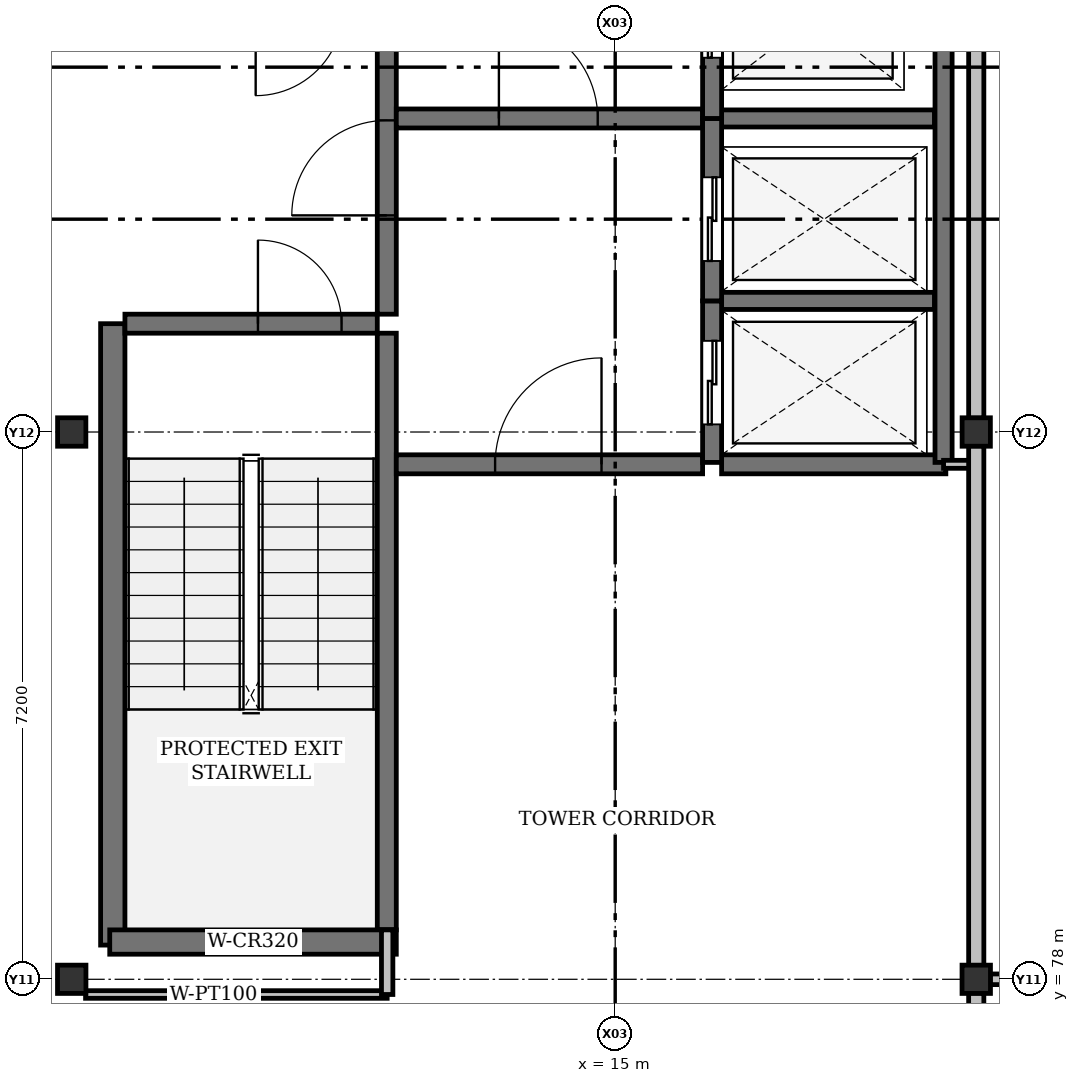
"""IFC4 building model, lengths in metres.
Left out: names, types, materials, properties, quantities, classifications, styles, units other than length and angle.
Written with IfcOpenShell. Run it as: python <this file> out.ifc"""

import sys

from ifc_helpers import new_model, si_unit, direction, frame, frame_2d, origin, origin_2d, place, context, subcontext, project, spatial, rectangle, i_section, extrude, element, fill, save


model = new_model("IFC4")
c1 = context("Model", 3, precision=1e-05, world=origin(), true_north=direction((0.0, 1.0)))
c2 = subcontext(c1, "Body", "Model", "MODEL_VIEW")
j1 = project(units=[si_unit("LENGTHUNIT", "METRE"), si_unit("PLANEANGLEUNIT", "RADIAN")], contexts=[c1])
p1 = place(None, origin())
s1 = spatial("IfcSite", under=j1, at=p1, CompositionType="ELEMENT")
p2 = place(p1, origin())
s2 = spatial("IfcBuilding", under=s1, at=p2, CompositionType="ELEMENT")
p3 = place(p2, frame((0.0, 0.0, 30.9)))
s3 = spatial("IfcBuildingStorey", under=s2, at=p3, CompositionType="ELEMENT", Elevation=30.9)
for number, where, z_axis, x_axis in (
    (1, (7.85, 78.0, 0.0), (0.0, 0.0, 1.0), (1.0, 0.0, 0.0)),
    (2, (19.75, 78.0, 0.0), (0.0, 0.0, 1.0), (1.0, 0.0, 0.0)),
    (3, (7.85, 85.2, 0.0), (0.0, 0.0, 1.0), (0.0, 1.0, 0.0)),
    (4, (19.75, 85.2, 0.0), (0.0, 0.0, 1.0), (0.0, 1.0, 0.0)),
):
    element("IfcColumn", number, at=place(p3, frame(where, z_axis=z_axis, x_axis=x_axis)), inside=s3, PredefinedType="COLUMN", context=c2, shape_type="SweptSolid", body=[
        extrude(i_section(OverallWidth=0.374, OverallDepth=0.372, WebThickness=0.016, FlangeThickness=0.026, FilletRadius=0.015, at=origin_2d()), origin(), (0.0, 0.0, 1.0), 4.2),
    ])
p4 = place(p3, frame((8.39, 78.45, 0.0), z_axis=(0.0, 0.0, 1.0), x_axis=(0.0, 1.0, 0.0)))
e5 = element("IfcWall", 5, at=p4, inside=s3, PredefinedType="SHEAR", context=c2, shape_type="SweptSolid", body=[
    extrude(rectangle(XDim=8.175, YDim=0.32, at=frame_2d((4.087, 0.0))), origin(), (0.0, 0.0, 1.0), 4.2),
])
p5 = place(p3, frame((11.995, 78.65, 0.0), z_axis=(0.0, 0.0, 1.0), x_axis=(0.0, 1.0, 0.0)))
e6 = element("IfcWall", 6, at=p5, inside=s3, PredefinedType="SHEAR", context=c2, shape_type="SweptSolid", body=[
    extrude(rectangle(XDim=7.85, YDim=0.25, at=frame_2d((3.925, 0.0))), origin(), (0.0, 0.0, 1.0), 4.2),
])
p6 = place(p3, frame((11.995, 86.75, 0.0), z_axis=(0.0, 0.0, 1.0), x_axis=(0.0, 1.0, 0.0)))
e7 = element("IfcWall", 7, at=p6, inside=s3, PredefinedType="SHEAR", context=c2, shape_type="SweptSolid", body=[
    extrude(rectangle(XDim=3.9, YDim=0.25, at=frame_2d((1.95, 0.0))), origin(), (0.0, 0.0, 1.0), 4.2),
])
p7 = place(p6, frame((1.3, 0.0, 0.0)))
e8 = element("IfcOpeningElement", 8, at=p7, cuts=e7, PredefinedType="OPENING", context=c2, shape_type="SweptSolid", body=[
    extrude(rectangle(XDim=1.25, YDim=2.2, at=frame_2d((0.625, 1.1))), frame((0.0, 0.125, 0.0), z_axis=(0.0, -1.0, 0.0), x_axis=(1.0, 0.0, 0.0)), (0.0, 0.0, 1.0), 0.25),
])
p8 = place(p3, frame((8.35, 78.49, 0.0), z_axis=(0.0, 0.0, 1.0), x_axis=(1.0, 0.0, 0.0)))
e9 = element("IfcWall", 9, at=p8, inside=s3, PredefinedType="SHEAR", context=c2, shape_type="SweptSolid", body=[
    extrude(rectangle(XDim=3.77, YDim=0.32, at=frame_2d((1.885, 0.0))), origin(), (0.0, 0.0, 1.0), 4.2),
])
p9 = place(p3, frame((8.55, 86.625, 0.0), z_axis=(0.0, 0.0, 1.0), x_axis=(1.0, 0.0, 0.0)))
e10 = element("IfcWall", 10, at=p9, inside=s3, PredefinedType="SHEAR", context=c2, shape_type="SweptSolid", body=[
    extrude(rectangle(XDim=3.32, YDim=0.25, at=frame_2d((1.66, 0.0))), origin(), (0.0, 0.0, 1.0), 4.2),
])
p10 = place(p9, frame((1.75, 0.0, 0.0)))
e11 = element("IfcOpeningElement", 11, at=p10, cuts=e10, PredefinedType="OPENING", context=c2, shape_type="SweptSolid", body=[
    extrude(rectangle(XDim=1.1, YDim=2.15, at=frame_2d((0.55, 1.075))), frame((0.0, 0.125, 0.0), z_axis=(0.0, -1.0, 0.0), x_axis=(1.0, 0.0, 0.0)), (0.0, 0.0, 1.0), 0.25),
])
p11 = place(p3, frame((12.12, 89.325, 0.0), z_axis=(0.0, 0.0, 1.0), x_axis=(1.0, 0.0, 0.0)))
e12 = element("IfcWall", 12, at=p11, inside=s3, PredefinedType="SHEAR", context=c2, shape_type="SweptSolid", body=[
    extrude(rectangle(XDim=4.03, YDim=0.25, at=frame_2d((2.015, 0.0))), origin(), (0.0, 0.0, 1.0), 4.2),
])
p12 = place(p11, frame((1.35, 0.0, 0.0)))
e13 = element("IfcOpeningElement", 13, at=p12, cuts=e12, PredefinedType="OPENING", context=c2, shape_type="SweptSolid", body=[
    extrude(rectangle(XDim=1.3, YDim=2.2, at=frame_2d((0.65, 1.1))), frame((0.0, 0.125, 0.0), z_axis=(0.0, -1.0, 0.0), x_axis=(1.0, 0.0, 0.0)), (0.0, 0.0, 1.0), 0.25),
])
p13 = place(p3, frame((12.12, 84.775, 0.0), z_axis=(0.0, 0.0, 1.0), x_axis=(1.0, 0.0, 0.0)))
e14 = element("IfcWall", 14, at=p13, inside=s3, PredefinedType="SHEAR", context=c2, shape_type="SweptSolid", body=[
    extrude(rectangle(XDim=4.03, YDim=0.25, at=frame_2d((2.015, 0.0))), origin(), (0.0, 0.0, 1.0), 4.2),
])
p14 = place(p13, frame((1.3, 0.0, 0.0)))
e15 = element("IfcOpeningElement", 15, at=p14, cuts=e14, PredefinedType="OPENING", context=c2, shape_type="SweptSolid", body=[
    extrude(rectangle(XDim=1.4, YDim=2.25, at=frame_2d((0.7, 1.125))), frame((0.0, 0.125, 0.0), z_axis=(0.0, -1.0, 0.0), x_axis=(1.0, 0.0, 0.0)), (0.0, 0.0, 1.0), 0.25),
])
p15 = place(p3, frame((16.4, 84.775, 0.0), z_axis=(0.0, 0.0, 1.0), x_axis=(1.0, 0.0, 0.0)))
e16 = element("IfcWall", 16, at=p15, inside=s3, PredefinedType="SHEAR", context=c2, shape_type="SweptSolid", body=[
    extrude(rectangle(XDim=2.95, YDim=0.25, at=frame_2d((1.475, 0.0))), origin(), (0.0, 0.0, 1.0), 4.2),
])
p16 = place(p3, frame((19.32, 84.8, 0.0), z_axis=(0.0, 0.0, 1.0), x_axis=(0.0, 1.0, 0.0)))
e17 = element("IfcWall", 17, at=p16, inside=s3, PredefinedType="SHEAR", context=c2, shape_type="SweptSolid", body=[
    extrude(rectangle(XDim=13.95, YDim=0.225, at=frame_2d((6.975, 0.0))), origin(), (0.0, 0.0, 1.0), 4.2),
])
for number, where, z_axis, x_axis in (
    (18, (16.4, 86.925, 0.0), (0.0, 0.0, 1.0), (1.0, 0.0, 0.0)),
    (19, (16.4, 89.325, 0.0), (0.0, 0.0, 1.0), (1.0, 0.0, 0.0)),
):
    element("IfcWall", number, at=place(p3, frame(where, z_axis=z_axis, x_axis=x_axis)), inside=s3, PredefinedType="SHEAR", context=c2, shape_type="SweptSolid", body=[
        extrude(rectangle(XDim=2.8, YDim=0.225, at=frame_2d((1.4, 0.0))), origin(), (0.0, 0.0, 1.0), 4.2),
    ])
p17 = place(p3, frame((16.275, 84.8, 0.0), z_axis=(0.0, 0.0, 1.0), x_axis=(0.0, 1.0, 0.0)))
e20 = element("IfcWall", 20, at=p17, inside=s3, PredefinedType="SHEAR", context=c2, shape_type="SweptSolid", body=[
    extrude(rectangle(XDim=2.125, YDim=0.25, at=frame_2d((1.062, 0.0))), origin(), (0.0, 0.0, 1.0), 4.2),
])
p18 = place(p17, frame((0.5, 0.0, 0.0)))
e21 = element("IfcOpeningElement", 21, at=p18, cuts=e20, PredefinedType="OPENING", context=c2, shape_type="SweptSolid", body=[
    extrude(rectangle(XDim=1.1, YDim=2.15, at=frame_2d((0.55, 1.075))), frame((0.0, 0.125, 0.0), z_axis=(0.0, -1.0, 0.0), x_axis=(1.0, 0.0, 0.0)), (0.0, 0.0, 1.0), 0.25),
])
p19 = place(p3, frame((16.275, 86.925, 0.0), z_axis=(0.0, 0.0, 1.0), x_axis=(0.0, 1.0, 0.0)))
e22 = element("IfcWall", 22, at=p19, inside=s3, PredefinedType="SHEAR", context=c2, shape_type="SweptSolid", body=[
    extrude(rectangle(XDim=2.4, YDim=0.25, at=frame_2d((1.2, 0.0))), origin(), (0.0, 0.0, 1.0), 4.2),
])
p20 = place(p19, frame((0.525, 0.0, 0.0)))
e23 = element("IfcOpeningElement", 23, at=p20, cuts=e22, PredefinedType="OPENING", context=c2, shape_type="SweptSolid", body=[
    extrude(rectangle(XDim=1.1, YDim=2.15, at=frame_2d((0.55, 1.075))), frame((0.0, 0.125, 0.0), z_axis=(0.0, -1.0, 0.0), x_axis=(1.0, 0.0, 0.0)), (0.0, 0.0, 1.0), 0.25),
])
p21 = place(p3, frame((16.275, 89.325, 0.0), z_axis=(0.0, 0.0, 1.0), x_axis=(0.0, 1.0, 0.0)))
e24 = element("IfcWall", 24, at=p21, inside=s3, PredefinedType="SHEAR", context=c2, shape_type="SweptSolid", body=[
    extrude(rectangle(XDim=2.4, YDim=0.25, at=frame_2d((1.2, 0.0))), origin(), (0.0, 0.0, 1.0), 4.2),
])
p22 = place(p21, frame((0.8, 0.0, 0.0)))
e25 = element("IfcOpeningElement", 25, at=p22, cuts=e24, PredefinedType="OPENING", context=c2, shape_type="SweptSolid", body=[
    extrude(rectangle(XDim=1.05, YDim=2.15, at=frame_2d((0.525, 1.075))), frame((0.0, 0.125, 0.0), z_axis=(0.0, -1.0, 0.0), x_axis=(1.0, 0.0, 0.0)), (0.0, 0.0, 1.0), 0.25),
])
p23 = place(p3, frame((19.32, 84.775, 0.0), z_axis=(0.0, 0.0, 1.0), x_axis=(1.0, 0.0, 0.0)))
e26 = element("IfcWall", 26, at=p23, inside=s3, PredefinedType="PARTITIONING", context=c2, shape_type="SweptSolid", body=[
    extrude(rectangle(XDim=0.43, YDim=0.105, at=frame_2d((0.215, 0.0))), origin(), (0.0, 0.0, 1.0), 3.512),
])
p24 = place(p3, frame((8.032, 77.8, 0.0), z_axis=(0.0, 0.0, 1.0), x_axis=(1.0, 0.0, 0.0)))
e27 = element("IfcWall", 27, at=p24, inside=s3, PredefinedType="PARTITIONING", context=c2, shape_type="SweptSolid", body=[
    extrude(rectangle(XDim=3.968, YDim=0.1, at=frame_2d((1.984, 0.0))), origin(), (0.0, 0.0, 1.0), 3.436),
])
p25 = place(p3, frame((12.0, 77.8, 0.0), z_axis=(0.0, 0.0, 1.0), x_axis=(0.0, 1.0, 0.0)))
e28 = element("IfcWall", 28, at=p25, inside=s3, PredefinedType="PARTITIONING", context=c2, shape_type="SweptSolid", body=[
    extrude(rectangle(XDim=0.85, YDim=0.15, at=frame_2d((0.425, 0.0))), origin(), (0.0, 0.0, 1.0), 3.436),
])
p26 = place(p3, frame((19.75, 78.181, 0.0), z_axis=(0.0, 0.0, 1.0), x_axis=(0.0, 1.0, 0.0)))
e29 = element("IfcWall", 29, at=p26, inside=s3, PredefinedType="SOLIDWALL", context=c2, shape_type="SweptSolid", body=[
    extrude(rectangle(XDim=6.837, YDim=0.2, at=frame_2d((3.418, 0.0))), origin(), (0.0, 0.0, 1.0), 3.512),
])
p27 = place(p3, frame((19.75, 85.382, 0.0), z_axis=(0.0, 0.0, 1.0), x_axis=(0.0, 1.0, 0.0)))
e30 = element("IfcWall", 30, at=p27, inside=s3, PredefinedType="SOLIDWALL", context=c2, shape_type="SweptSolid", body=[
    extrude(rectangle(XDim=6.837, YDim=0.2, at=frame_2d((3.418, 0.0))), origin(), (0.0, 0.0, 1.0), 3.512),
])
p28 = place(p3, frame((27.743, 78.0, 0.0), z_axis=(0.0, 0.0, 1.0), x_axis=(-1.0, 0.0, 0.0)))
e31 = element("IfcWall", 31, at=p28, inside=s3, PredefinedType="PARTITIONING", context=c2, shape_type="SweptSolid", body=[
    extrude(rectangle(XDim=7.811, YDim=0.14, at=frame_2d((3.906, 0.0))), origin(), (0.0, 0.0, 1.0), 2.775),
])
p29 = place(p3, frame((19.75, 70.682, 0.0), z_axis=(0.0, 0.0, 1.0), x_axis=(0.0, 1.0, 0.0)))
e32 = element("IfcWall", 32, at=p29, inside=s3, PredefinedType="SOLIDWALL", context=c2, shape_type="SweptSolid", body=[
    extrude(rectangle(XDim=7.137, YDim=0.2, at=frame_2d((3.569, 0.0))), origin(), (0.0, 0.0, 1.0), 3.512),
])
p30 = place(p29, frame((5.318, 0.0, 0.0)))
e33 = element("IfcOpeningElement", 33, at=p30, cuts=e32, PredefinedType="OPENING", context=c2, shape_type="SweptSolid", body=[
    extrude(rectangle(XDim=1.5, YDim=2.3, at=frame_2d((0.75, 1.15))), frame((0.0, 0.1, 0.0), z_axis=(0.0, -1.0, 0.0), x_axis=(1.0, 0.0, 0.0)), (0.0, 0.0, 1.0), 0.2),
])
p31 = place(p7, origin())
e34 = element("IfcDoor", 34, at=p31, inside=s3, OperationType="SINGLE_SWING_LEFT", PredefinedType="DOOR", context=c2, shape_type="SweptSolid", body=[
    extrude(rectangle(XDim=1.25, YDim=2.2, at=frame_2d((0.625, 1.1))), frame((0.0, 0.025, 0.0), z_axis=(0.0, -1.0, 0.0), x_axis=(1.0, 0.0, 0.0)), (0.0, 0.0, 1.0), 0.05),
])
fill(e8, e34)
p32 = place(p10, origin())
e35 = element("IfcDoor", 35, at=p32, inside=s3, OperationType="SINGLE_SWING_LEFT", PredefinedType="DOOR", context=c2, shape_type="SweptSolid", body=[
    extrude(rectangle(XDim=1.1, YDim=2.15, at=frame_2d((0.55, 1.075))), frame((0.0, 0.025, 0.0), z_axis=(0.0, -1.0, 0.0), x_axis=(1.0, 0.0, 0.0)), (0.0, 0.0, 1.0), 0.05),
])
fill(e11, e35)
p33 = place(p12, origin())
e36 = element("IfcDoor", 36, at=p33, inside=s3, OperationType="SINGLE_SWING_LEFT", PredefinedType="DOOR", context=c2, shape_type="SweptSolid", body=[
    extrude(rectangle(XDim=1.3, YDim=2.2, at=frame_2d((0.65, 1.1))), frame((0.0, 0.025, 0.0), z_axis=(0.0, -1.0, 0.0), x_axis=(1.0, 0.0, 0.0)), (0.0, 0.0, 1.0), 0.05),
])
fill(e13, e36)
p34 = place(p14, origin())
e37 = element("IfcDoor", 37, at=p34, inside=s3, OperationType="SINGLE_SWING_RIGHT", PredefinedType="DOOR", context=c2, shape_type="SweptSolid", body=[
    extrude(rectangle(XDim=1.4, YDim=2.25, at=frame_2d((0.7, 1.125))), frame((0.0, 0.025, 0.0), z_axis=(0.0, -1.0, 0.0), x_axis=(1.0, 0.0, 0.0)), (0.0, 0.0, 1.0), 0.05),
])
fill(e15, e37)
p35 = place(p18, origin())
e38 = element("IfcDoor", 38, at=p35, inside=s3, OperationType="SLIDING_TO_LEFT", PredefinedType="DOOR", context=c2, shape_type="SweptSolid", body=[
    extrude(rectangle(XDim=1.1, YDim=2.15, at=frame_2d((0.55, 1.075))), frame((0.0, 0.025, 0.0), z_axis=(0.0, -1.0, 0.0), x_axis=(1.0, 0.0, 0.0)), (0.0, 0.0, 1.0), 0.05),
])
fill(e21, e38)
p36 = place(p20, origin())
e39 = element("IfcDoor", 39, at=p36, inside=s3, OperationType="SLIDING_TO_LEFT", PredefinedType="DOOR", context=c2, shape_type="SweptSolid", body=[
    extrude(rectangle(XDim=1.1, YDim=2.15, at=frame_2d((0.55, 1.075))), frame((0.0, 0.025, 0.0), z_axis=(0.0, -1.0, 0.0), x_axis=(1.0, 0.0, 0.0)), (0.0, 0.0, 1.0), 0.05),
])
fill(e23, e39)
p37 = place(p22, origin())
e40 = element("IfcDoor", 40, at=p37, inside=s3, OperationType="SLIDING_TO_LEFT", PredefinedType="DOOR", context=c2, shape_type="SweptSolid", body=[
    extrude(rectangle(XDim=1.05, YDim=2.15, at=frame_2d((0.525, 1.075))), frame((0.0, 0.025, 0.0), z_axis=(0.0, -1.0, 0.0), x_axis=(1.0, 0.0, 0.0)), (0.0, 0.0, 1.0), 0.05),
])
fill(e25, e40)
save(model, sys.argv[1])
